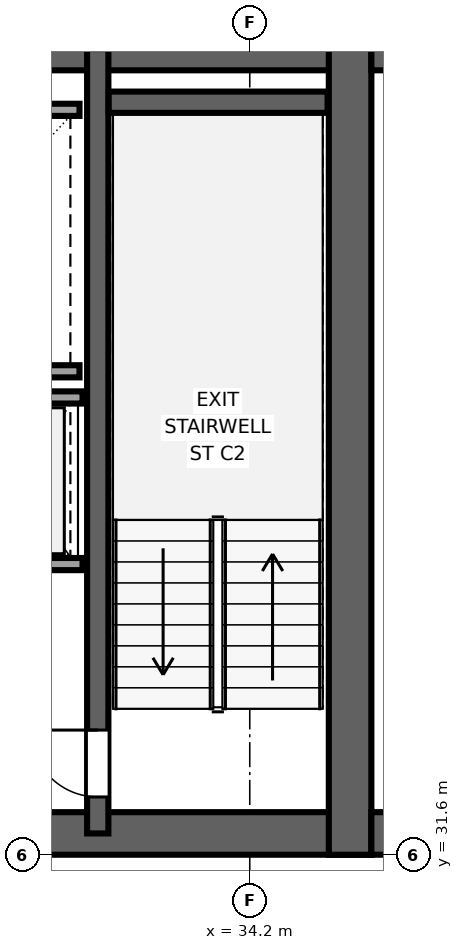
"""IFC4 building model, lengths in metres.
Left out: names, types, materials, properties, quantities, classifications, styles, units other than length and angle.
Written with IfcOpenShell. Run it as: python <this file> out.ifc"""

import sys

from ifc_helpers import new_model, si_unit, direction, frame, frame_2d, origin, place, context, subcontext, project, spatial, rectangle, extrude, source, transform, mapped, element, fill, save


model = new_model("IFC4")
c1 = context("Model", 3, precision=1e-05, world=origin(), true_north=direction((0.0, 1.0)))
c2 = subcontext(c1, "Body", "Model", "MODEL_VIEW")
j1 = project(units=[si_unit("LENGTHUNIT", "METRE"), si_unit("PLANEANGLEUNIT", "RADIAN")], contexts=[c1])
p1 = place(None, origin())
s1 = spatial("IfcSite", under=j1, at=p1, CompositionType="ELEMENT")
p2 = place(p1, origin())
s2 = spatial("IfcBuilding", under=s1, at=p2, CompositionType="ELEMENT")
p3 = place(p2, frame((0.0, 0.0, 122.2)))
s3 = spatial("IfcBuildingStorey", under=s2, at=p3, CompositionType="ELEMENT", Elevation=122.2)
p4 = place(p3, frame((9.8, 31.95, 0.0), z_axis=(0.0, 0.0, 1.0), x_axis=(1.0, 0.0, 0.0)))
e1 = element("IfcWall", 1, at=p4, inside=s3, PredefinedType="SHEAR", context=c2, shape_type="SweptSolid", body=[
    extrude(rectangle(XDim=26.4, YDim=0.7, at=frame_2d((13.2, 0.0))), origin(), (0.0, 0.0, 1.0), 3.55),
])
p5 = place(p4, frame((6.32, 0.0, 0.0), z_axis=(0.0, 0.0, 1.0), x_axis=(-1.0, 0.0, 0.0)))
e2 = element("IfcOpeningElement", 2, at=p5, cuts=e1, PredefinedType="OPENING", context=c2, shape_type="SweptSolid", body=[
    extrude(rectangle(XDim=1.5, YDim=2.04, at=frame_2d((0.75, 1.02))), frame((0.0, 0.36, 0.0), z_axis=(0.0, -1.0, 0.0), x_axis=(1.0, 0.0, 0.0)), (0.0, 0.0, 1.0), 0.72),
])
p6 = place(p4, frame((13.95, 0.0, 0.0), z_axis=(0.0, 0.0, 1.0), x_axis=(-1.0, 0.0, 0.0)))
e3 = element("IfcOpeningElement", 3, at=p6, cuts=e1, PredefinedType="OPENING", context=c2, shape_type="SweptSolid", body=[
    extrude(rectangle(XDim=1.5, YDim=2.04, at=frame_2d((0.75, 1.02))), frame((0.0, 0.36, 0.0), z_axis=(0.0, -1.0, 0.0), x_axis=(1.0, 0.0, 0.0)), (0.0, 0.0, 1.0), 0.72),
])
p7 = place(p4, frame((20.25, 0.0, 0.0), z_axis=(0.0, 0.0, 1.0), x_axis=(-1.0, 0.0, 0.0)))
e4 = element("IfcOpeningElement", 4, at=p7, cuts=e1, PredefinedType="OPENING", context=c2, shape_type="SweptSolid", body=[
    extrude(rectangle(XDim=1.5, YDim=2.04, at=frame_2d((0.75, 1.02))), frame((0.0, 0.36, 0.0), z_axis=(0.0, -1.0, 0.0), x_axis=(1.0, 0.0, 0.0)), (0.0, 0.0, 1.0), 0.72),
])
p8 = place(p4, frame((8.37, 0.0, 0.0), z_axis=(0.0, 0.0, 1.0), x_axis=(-1.0, 0.0, 0.0)))
e5 = element("IfcOpeningElement", 5, at=p8, cuts=e1, PredefinedType="OPENING", context=c2, shape_type="SweptSolid", body=[
    extrude(rectangle(XDim=0.82, YDim=2.01, at=frame_2d((0.41, 1.005))), frame((0.0, 0.36, 0.0), z_axis=(0.0, -1.0, 0.0), x_axis=(1.0, 0.0, 0.0)), (0.0, 0.0, 1.0), 0.72),
])
p9 = place(p3, frame((9.8, 44.85, 0.0), z_axis=(0.0, 0.0, 1.0), x_axis=(1.0, 0.0, 0.0)))
e6 = element("IfcWall", 6, at=p9, inside=s3, PredefinedType="SHEAR", context=c2, shape_type="SweptSolid", body=[
    extrude(rectangle(XDim=26.4, YDim=0.7, at=frame_2d((13.2, 0.0))), origin(), (0.0, 0.0, 1.0), 3.55),
])
p10 = place(p3, frame((35.85, 31.6, 0.0), z_axis=(0.0, 0.0, 1.0), x_axis=(0.0, 1.0, 0.0)))
e7 = element("IfcWall", 7, at=p10, inside=s3, PredefinedType="SHEAR", context=c2, shape_type="SweptSolid", body=[
    extrude(rectangle(XDim=13.6, YDim=0.7, at=frame_2d((6.8, 0.0))), origin(), (0.0, 0.0, 1.0), 3.55),
])
p11 = place(p3, frame((31.7, 31.95, 0.0), z_axis=(0.0, 0.0, 1.0), x_axis=(0.0, 1.0, 0.0)))
e8 = element("IfcWall", 8, at=p11, inside=s3, PredefinedType="SHEAR", context=c2, shape_type="SweptSolid", body=[
    extrude(rectangle(XDim=12.9, YDim=0.35, at=frame_2d((6.45, 0.0))), origin(), (0.0, 0.0, 1.0), 3.55),
])
p12 = place(p11, frame((1.7, 0.0, 0.0), z_axis=(0.0, 0.0, 1.0), x_axis=(-1.0, 0.0, 0.0)))
e9 = element("IfcOpeningElement", 9, at=p12, cuts=e8, PredefinedType="OPENING", context=c2, shape_type="SweptSolid", body=[
    extrude(rectangle(XDim=1.1, YDim=2.12, at=frame_2d((0.55, 1.06))), frame((0.0, 0.185, 0.0), z_axis=(0.0, -1.0, 0.0), x_axis=(1.0, 0.0, 0.0)), (0.0, 0.0, 1.0), 0.37),
])
p13 = place(p3, frame((36.2, 31.95, 0.0), z_axis=(0.0, 0.0, 1.0), x_axis=(1.0, 0.0, 0.0)))
e10 = element("IfcWall", 10, at=p13, inside=s3, PredefinedType="SHEAR", context=c2, shape_type="SweptSolid", body=[
    extrude(rectangle(XDim=4.2, YDim=0.7, at=frame_2d((2.1, 0.0))), origin(), (0.0, 0.0, 1.0), 3.55),
])
p14 = place(p13, frame((1.34, 0.0, 0.0), z_axis=(0.0, 0.0, 1.0), x_axis=(-1.0, 0.0, 0.0)))
e11 = element("IfcOpeningElement", 11, at=p14, cuts=e10, PredefinedType="OPENING", context=c2, shape_type="SweptSolid", body=[
    extrude(rectangle(XDim=1.02, YDim=2.03, at=frame_2d((0.51, 1.015))), frame((0.0, 0.36, 0.0), z_axis=(0.0, -1.0, 0.0), x_axis=(1.0, 0.0, 0.0)), (0.0, 0.0, 1.0), 0.72),
])
p15 = place(p3, frame((36.2, 44.85, 0.0), z_axis=(0.0, 0.0, 1.0), x_axis=(1.0, 0.0, 0.0)))
e12 = element("IfcWall", 12, at=p15, inside=s3, PredefinedType="SHEAR", context=c2, shape_type="SweptSolid", body=[
    extrude(rectangle(XDim=4.2, YDim=0.7, at=frame_2d((2.1, 0.0))), origin(), (0.0, 0.0, 1.0), 3.55),
])
p16 = place(p3, frame((31.88, 43.975, 0.0), z_axis=(0.0, 0.0, 1.0), x_axis=(1.0, 0.0, 0.0)))
e13 = element("IfcWall", 13, at=p16, inside=s3, PredefinedType="SHEAR", context=c2, shape_type="SweptSolid", body=[
    extrude(rectangle(XDim=3.6, YDim=0.35, at=frame_2d((1.8, 0.0))), origin(), (0.0, 0.0, 1.0), 3.55),
])
for number, where, z_axis, x_axis in (
    (14, (27.3, 39.55, 0.0), (0.0, 0.0, 1.0), (1.0, 0.0, 0.0)),
    (15, (27.3, 43.85, 0.0), (0.0, 0.0, 1.0), (1.0, 0.0, 0.0)),
):
    element("IfcWall", number, at=place(p3, frame(where, z_axis=z_axis, x_axis=x_axis)), inside=s3, PredefinedType="SOLIDWALL", context=c2, shape_type="SweptSolid", body=[
        extrude(rectangle(XDim=4.1, YDim=0.2, at=frame_2d((2.05, 0.0))), origin(), (0.0, 0.0, 1.0), 3.37),
    ])
p17 = place(p3, frame((27.375, 36.38, 0.0), z_axis=(0.0, 0.0, 1.0), x_axis=(1.0, 0.0, 0.0)))
e16 = element("IfcWall", 16, at=p17, inside=s3, PredefinedType="SOLIDWALL", context=c2, shape_type="SweptSolid", body=[
    extrude(rectangle(XDim=4.075, YDim=0.2, at=frame_2d((2.038, 0.0))), origin(), (0.0, 0.0, 1.0), 3.37),
])
p18 = place(p17, frame((0.525, 0.0, 0.0)))
e17 = element("IfcOpeningElement", 17, at=p18, cuts=e16, PredefinedType="OPENING", context=c2, shape_type="SweptSolid", body=[
    extrude(rectangle(XDim=1.1, YDim=2.12, at=frame_2d((0.55, 1.06))), frame((0.0, 0.11, 0.0), z_axis=(0.0, -1.0, 0.0), x_axis=(1.0, 0.0, 0.0)), (0.0, 0.0, 1.0), 0.22),
])
p19 = place(p17, frame((2.425, 0.0, 0.0)))
e18 = element("IfcOpeningElement", 18, at=p19, cuts=e16, PredefinedType="OPENING", context=c2, shape_type="SweptSolid", body=[
    extrude(rectangle(XDim=1.1, YDim=2.12, at=frame_2d((0.55, 1.06))), frame((0.0, 0.11, 0.0), z_axis=(0.0, -1.0, 0.0), x_axis=(1.0, 0.0, 0.0)), (0.0, 0.0, 1.0), 0.22),
])
p20 = place(p3, frame((27.375, 39.12, 0.0), z_axis=(0.0, 0.0, 1.0), x_axis=(1.0, 0.0, 0.0)))
e19 = element("IfcWall", 19, at=p20, inside=s3, PredefinedType="SOLIDWALL", context=c2, shape_type="SweptSolid", body=[
    extrude(rectangle(XDim=4.075, YDim=0.2, at=frame_2d((2.038, 0.0))), origin(), (0.0, 0.0, 1.0), 3.37),
])
m1 = source(origin(), c2, "Body", "SweptSolid", [
    extrude(rectangle(XDim=1.1, YDim=2.12, at=frame_2d((0.55, 1.06))), frame((0.0, 0.025, 0.0), z_axis=(0.0, -1.0, 0.0), x_axis=(1.0, 0.0, 0.0)), (0.0, 0.0, 1.0), 0.05),
])
p21 = place(p12, origin())
e20 = element("IfcDoor", 20, at=p21, inside=s3, OperationType="SINGLE_SWING_RIGHT", PredefinedType="DOOR", context=c2, shape_type="MappedRepresentation", body=[
    mapped(m1, transform((0.0, 0.0, 0.0), x_axis=(1.0, 0.0, 0.0), y_axis=(0.0, 1.0, 0.0), z_axis=(0.0, 0.0, 1.0), scale=1.0)),
])
fill(e9, e20)
save(model, sys.argv[1])
